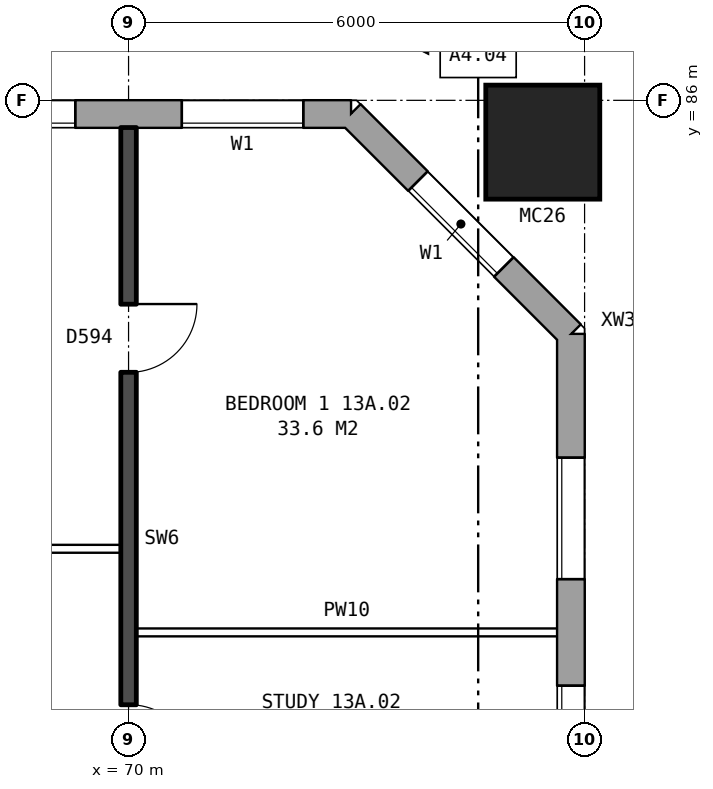
"""IFC4 building model, lengths in metres.
Left out: names, types, materials, properties, quantities, classifications, styles, units other than length and angle.
Written with IfcOpenShell. Run it as: python <this file> out.ifc"""

import sys

from ifc_helpers import new_model, si_unit, direction, frame, frame_2d, origin, origin_2d, place, context, subcontext, project, spatial, rectangle, hollow_rectangle, extrude, element, fill, save


model = new_model("IFC4")
c1 = context("Model", 3, precision=1e-05, world=origin(), true_north=direction((0.0, 1.0)))
c2 = subcontext(c1, "Body", "Model", "MODEL_VIEW")
j1 = project(units=[si_unit("LENGTHUNIT", "METRE"), si_unit("PLANEANGLEUNIT", "RADIAN")], contexts=[c1])
p1 = place(None, origin())
s1 = spatial("IfcSite", under=j1, at=p1, CompositionType="ELEMENT")
p2 = place(p1, origin())
s2 = spatial("IfcBuilding", under=s1, at=p2, CompositionType="ELEMENT")
p3 = place(p2, frame((0.0, 0.0, 50.5)))
s3 = spatial("IfcBuildingStorey", under=s2, at=p3, CompositionType="ELEMENT", Elevation=50.5)
p4 = place(p3, frame((75.45, 85.45, 0.0), z_axis=(0.0, 0.0, 1.0), x_axis=(1.0, 0.0, 0.0)))
e1 = element("IfcColumn", 1, at=p4, inside=s3, PredefinedType="COLUMN", context=c2, shape_type="SweptSolid", body=[
    extrude(hollow_rectangle(XDim=1.5, YDim=1.5, WallThickness=0.08, at=origin_2d()), origin(), (0.0, 0.0, 1.0), 3.1),
])
p5 = place(p3, frame((75.82, 57.075, 0.0), z_axis=(0.0, 0.0, 1.0), x_axis=(0.0, 1.0, 0.0)))
e2 = element("IfcWall", 2, at=p5, inside=s3, PredefinedType="STANDARD", context=c2, shape_type="SweptSolid", body=[
    extrude(rectangle(XDim=25.851, YDim=0.36, at=frame_2d((12.925, 0.0))), origin(), (0.0, 0.0, 1.0), 2.85),
])
p6 = place(p5, frame((1.625, 0.0, 0.8)))
e3 = element("IfcOpeningElement", 3, at=p6, cuts=e2, PredefinedType="OPENING", context=c2, shape_type="SweptSolid", body=[
    extrude(rectangle(XDim=1.6, YDim=1.8, at=frame_2d((0.8, 0.9))), frame((0.0, 0.19, 0.0), z_axis=(0.0, -1.0, 0.0), x_axis=(1.0, 0.0, 0.0)), (0.0, 0.0, 1.0), 0.38),
])
p7 = place(p5, frame((4.625, 0.0, 0.8)))
e4 = element("IfcOpeningElement", 4, at=p7, cuts=e2, PredefinedType="OPENING", context=c2, shape_type="SweptSolid", body=[
    extrude(rectangle(XDim=1.6, YDim=1.8, at=frame_2d((0.8, 0.9))), frame((0.0, 0.19, 0.0), z_axis=(0.0, -1.0, 0.0), x_axis=(1.0, 0.0, 0.0)), (0.0, 0.0, 1.0), 0.38),
])
p8 = place(p5, frame((19.625, 0.0, 0.8)))
e5 = element("IfcOpeningElement", 5, at=p8, cuts=e2, PredefinedType="OPENING", context=c2, shape_type="SweptSolid", body=[
    extrude(rectangle(XDim=1.6, YDim=1.8, at=frame_2d((0.8, 0.9))), frame((0.0, 0.19, 0.0), z_axis=(0.0, -1.0, 0.0), x_axis=(1.0, 0.0, 0.0)), (0.0, 0.0, 1.0), 0.38),
])
p9 = place(p5, frame((22.625, 0.0, 0.8)))
e6 = element("IfcOpeningElement", 6, at=p9, cuts=e2, PredefinedType="OPENING", context=c2, shape_type="SweptSolid", body=[
    extrude(rectangle(XDim=1.6, YDim=1.8, at=frame_2d((0.8, 0.9))), frame((0.0, 0.19, 0.0), z_axis=(0.0, -1.0, 0.0), x_axis=(1.0, 0.0, 0.0)), (0.0, 0.0, 1.0), 0.38),
])
p10 = place(p3, frame((75.82, 82.925, 0.0), z_axis=(0.0, 0.0, 1.0), x_axis=(-0.707106781187, 0.707106781187, 0.0)))
e7 = element("IfcWall", 7, at=p10, inside=s3, PredefinedType="STANDARD", context=c2, shape_type="SweptSolid", body=[
    extrude(rectangle(XDim=4.094, YDim=0.36, at=frame_2d((2.047, 0.0))), origin(), (0.0, 0.0, 1.0), 2.85),
])
p11 = place(p10, frame((1.247, 0.0, 0.8)))
e8 = element("IfcOpeningElement", 8, at=p11, cuts=e7, PredefinedType="OPENING", context=c2, shape_type="SweptSolid", body=[
    extrude(rectangle(XDim=1.6, YDim=1.8, at=frame_2d((0.8, 0.9))), frame((0.0, 0.19, 0.0), z_axis=(0.0, -1.0, 0.0), x_axis=(1.0, 0.0, 0.0)), (0.0, 0.0, 1.0), 0.38),
])
p12 = place(p3, frame((72.925, 85.82, 0.0), z_axis=(0.0, 0.0, 1.0), x_axis=(-1.0, 0.0, 0.0)))
e9 = element("IfcWall", 9, at=p12, inside=s3, PredefinedType="STANDARD", context=c2, shape_type="SweptSolid", body=[
    extrude(rectangle(XDim=48.351, YDim=0.36, at=frame_2d((24.175, 0.0))), origin(), (0.0, 0.0, 1.0), 2.85),
])
p13 = place(p12, frame((0.625, 0.0, 0.8)))
e10 = element("IfcOpeningElement", 10, at=p13, cuts=e9, PredefinedType="OPENING", context=c2, shape_type="SweptSolid", body=[
    extrude(rectangle(XDim=1.6, YDim=1.8, at=frame_2d((0.8, 0.9))), frame((0.0, 0.19, 0.0), z_axis=(0.0, -1.0, 0.0), x_axis=(1.0, 0.0, 0.0)), (0.0, 0.0, 1.0), 0.38),
])
p14 = place(p12, frame((3.625, 0.0, 0.8)))
e11 = element("IfcOpeningElement", 11, at=p14, cuts=e9, PredefinedType="OPENING", context=c2, shape_type="SweptSolid", body=[
    extrude(rectangle(XDim=1.6, YDim=1.8, at=frame_2d((0.8, 0.9))), frame((0.0, 0.19, 0.0), z_axis=(0.0, -1.0, 0.0), x_axis=(1.0, 0.0, 0.0)), (0.0, 0.0, 1.0), 0.38),
])
p15 = place(p12, frame((5.525, 0.0, 0.8)))
e12 = element("IfcOpeningElement", 12, at=p15, cuts=e9, PredefinedType="OPENING", context=c2, shape_type="SweptSolid", body=[
    extrude(rectangle(XDim=1.4, YDim=1.8, at=frame_2d((0.7, 0.9))), frame((0.0, 0.19, 0.0), z_axis=(0.0, -1.0, 0.0), x_axis=(1.0, 0.0, 0.0)), (0.0, 0.0, 1.0), 0.38),
])
p16 = place(p12, frame((9.225, 0.0, 0.45)))
e13 = element("IfcOpeningElement", 13, at=p16, cuts=e9, PredefinedType="OPENING", context=c2, shape_type="SweptSolid", body=[
    extrude(rectangle(XDim=1.0, YDim=0.9, at=frame_2d((0.5, 0.45))), frame((0.0, 0.19, 0.0), z_axis=(0.0, -1.0, 0.0), x_axis=(1.0, 0.0, 0.0)), (0.0, 0.0, 1.0), 0.38),
])
p17 = place(p12, frame((12.625, 0.0, 0.8)))
e14 = element("IfcOpeningElement", 14, at=p17, cuts=e9, PredefinedType="OPENING", context=c2, shape_type="SweptSolid", body=[
    extrude(rectangle(XDim=1.6, YDim=1.8, at=frame_2d((0.8, 0.9))), frame((0.0, 0.19, 0.0), z_axis=(0.0, -1.0, 0.0), x_axis=(1.0, 0.0, 0.0)), (0.0, 0.0, 1.0), 0.38),
])
p18 = place(p12, frame((15.625, 0.0, 0.8)))
e15 = element("IfcOpeningElement", 15, at=p18, cuts=e9, PredefinedType="OPENING", context=c2, shape_type="SweptSolid", body=[
    extrude(rectangle(XDim=1.6, YDim=1.8, at=frame_2d((0.8, 0.9))), frame((0.0, 0.19, 0.0), z_axis=(0.0, -1.0, 0.0), x_axis=(1.0, 0.0, 0.0)), (0.0, 0.0, 1.0), 0.38),
])
p19 = place(p12, frame((18.625, 0.0, 0.8)))
e16 = element("IfcOpeningElement", 16, at=p19, cuts=e9, PredefinedType="OPENING", context=c2, shape_type="SweptSolid", body=[
    extrude(rectangle(XDim=1.6, YDim=1.8, at=frame_2d((0.8, 0.9))), frame((0.0, 0.19, 0.0), z_axis=(0.0, -1.0, 0.0), x_axis=(1.0, 0.0, 0.0)), (0.0, 0.0, 1.0), 0.38),
])
p20 = place(p12, frame((21.625, 0.0, 0.8)))
e17 = element("IfcOpeningElement", 17, at=p20, cuts=e9, PredefinedType="OPENING", context=c2, shape_type="SweptSolid", body=[
    extrude(rectangle(XDim=1.6, YDim=1.8, at=frame_2d((0.8, 0.9))), frame((0.0, 0.19, 0.0), z_axis=(0.0, -1.0, 0.0), x_axis=(1.0, 0.0, 0.0)), (0.0, 0.0, 1.0), 0.38),
])
p21 = place(p12, frame((24.625, 0.0, 0.8)))
e18 = element("IfcOpeningElement", 18, at=p21, cuts=e9, PredefinedType="OPENING", context=c2, shape_type="SweptSolid", body=[
    extrude(rectangle(XDim=1.6, YDim=1.8, at=frame_2d((0.8, 0.9))), frame((0.0, 0.19, 0.0), z_axis=(0.0, -1.0, 0.0), x_axis=(1.0, 0.0, 0.0)), (0.0, 0.0, 1.0), 0.38),
])
p22 = place(p12, frame((27.625, 0.0, 0.8)))
e19 = element("IfcOpeningElement", 19, at=p22, cuts=e9, PredefinedType="OPENING", context=c2, shape_type="SweptSolid", body=[
    extrude(rectangle(XDim=1.6, YDim=1.8, at=frame_2d((0.8, 0.9))), frame((0.0, 0.19, 0.0), z_axis=(0.0, -1.0, 0.0), x_axis=(1.0, 0.0, 0.0)), (0.0, 0.0, 1.0), 0.38),
])
p23 = place(p12, frame((30.625, 0.0, 0.8)))
e20 = element("IfcOpeningElement", 20, at=p23, cuts=e9, PredefinedType="OPENING", context=c2, shape_type="SweptSolid", body=[
    extrude(rectangle(XDim=1.6, YDim=1.8, at=frame_2d((0.8, 0.9))), frame((0.0, 0.19, 0.0), z_axis=(0.0, -1.0, 0.0), x_axis=(1.0, 0.0, 0.0)), (0.0, 0.0, 1.0), 0.38),
])
p24 = place(p12, frame((33.625, 0.0, 0.8)))
e21 = element("IfcOpeningElement", 21, at=p24, cuts=e9, PredefinedType="OPENING", context=c2, shape_type="SweptSolid", body=[
    extrude(rectangle(XDim=1.6, YDim=1.8, at=frame_2d((0.8, 0.9))), frame((0.0, 0.19, 0.0), z_axis=(0.0, -1.0, 0.0), x_axis=(1.0, 0.0, 0.0)), (0.0, 0.0, 1.0), 0.38),
])
p25 = place(p12, frame((36.125, 0.0, 0.8)))
e22 = element("IfcOpeningElement", 22, at=p25, cuts=e9, PredefinedType="OPENING", context=c2, shape_type="SweptSolid", body=[
    extrude(rectangle(XDim=1.0, YDim=1.8, at=frame_2d((0.5, 0.9))), frame((0.0, 0.19, 0.0), z_axis=(0.0, -1.0, 0.0), x_axis=(1.0, 0.0, 0.0)), (0.0, 0.0, 1.0), 0.38),
])
p26 = place(p12, frame((39.975, 0.0, 1.7)))
e23 = element("IfcOpeningElement", 23, at=p26, cuts=e9, PredefinedType="OPENING", context=c2, shape_type="SweptSolid", body=[
    extrude(rectangle(XDim=1.0, YDim=0.9, at=frame_2d((0.5, 0.45))), frame((0.0, 0.19, 0.0), z_axis=(0.0, -1.0, 0.0), x_axis=(1.0, 0.0, 0.0)), (0.0, 0.0, 1.0), 0.38),
])
p27 = place(p12, frame((42.625, 0.0, 0.8)))
e24 = element("IfcOpeningElement", 24, at=p27, cuts=e9, PredefinedType="OPENING", context=c2, shape_type="SweptSolid", body=[
    extrude(rectangle(XDim=1.6, YDim=1.8, at=frame_2d((0.8, 0.9))), frame((0.0, 0.19, 0.0), z_axis=(0.0, -1.0, 0.0), x_axis=(1.0, 0.0, 0.0)), (0.0, 0.0, 1.0), 0.38),
])
p28 = place(p12, frame((45.625, 0.0, 0.8)))
e25 = element("IfcOpeningElement", 25, at=p28, cuts=e9, PredefinedType="OPENING", context=c2, shape_type="SweptSolid", body=[
    extrude(rectangle(XDim=1.6, YDim=1.8, at=frame_2d((0.8, 0.9))), frame((0.0, 0.19, 0.0), z_axis=(0.0, -1.0, 0.0), x_axis=(1.0, 0.0, 0.0)), (0.0, 0.0, 1.0), 0.38),
])
p29 = place(p12, frame((7.225, 0.0, 1.6)))
e26 = element("IfcOpeningElement", 26, at=p29, cuts=e9, PredefinedType="OPENING", context=c2, shape_type="SweptSolid", body=[
    extrude(rectangle(XDim=1.0, YDim=0.9, at=frame_2d((0.5, 0.45))), frame((0.0, 0.19, 0.0), z_axis=(0.0, -1.0, 0.0), x_axis=(1.0, 0.0, 0.0)), (0.0, 0.0, 1.0), 0.38),
])
p30 = place(p12, frame((10.575, 0.0, 0.45)))
e27 = element("IfcOpeningElement", 27, at=p30, cuts=e9, PredefinedType="OPENING", context=c2, shape_type="SweptSolid", body=[
    extrude(rectangle(XDim=1.2, YDim=1.8, at=frame_2d((0.6, 0.9))), frame((0.0, 0.19, 0.0), z_axis=(0.0, -1.0, 0.0), x_axis=(1.0, 0.0, 0.0)), (0.0, 0.0, 1.0), 0.38),
])
p31 = place(p12, frame((37.425, 0.0, 0.8)))
e28 = element("IfcOpeningElement", 28, at=p31, cuts=e9, PredefinedType="OPENING", context=c2, shape_type="SweptSolid", body=[
    extrude(rectangle(XDim=1.0, YDim=0.9, at=frame_2d((0.5, 0.45))), frame((0.0, 0.19, 0.0), z_axis=(0.0, -1.0, 0.0), x_axis=(1.0, 0.0, 0.0)), (0.0, 0.0, 1.0), 0.38),
])
p32 = place(p12, frame((41.275, 0.0, 0.8)))
e29 = element("IfcOpeningElement", 29, at=p32, cuts=e9, PredefinedType="OPENING", context=c2, shape_type="SweptSolid", body=[
    extrude(rectangle(XDim=1.0, YDim=1.8, at=frame_2d((0.5, 0.9))), frame((0.0, 0.19, 0.0), z_axis=(0.0, -1.0, 0.0), x_axis=(1.0, 0.0, 0.0)), (0.0, 0.0, 1.0), 0.38),
])
p33 = place(p3, frame((70.1, 79.0, 0.0), z_axis=(0.0, 0.0, 1.0), x_axis=(1.0, 0.0, 0.0)))
e30 = element("IfcWall", 30, at=p33, inside=s3, PredefinedType="PARTITIONING", context=c2, shape_type="SweptSolid", body=[
    extrude(rectangle(XDim=5.54, YDim=0.1, at=frame_2d((2.77, 0.0))), origin(), (0.0, 0.0, 1.0), 2.85),
])
p34 = place(p3, frame((64.1, 80.1, 0.0), z_axis=(0.0, 0.0, 1.0), x_axis=(1.0, 0.0, 0.0)))
e31 = element("IfcWall", 31, at=p34, inside=s3, PredefinedType="PARTITIONING", context=c2, shape_type="SweptSolid", body=[
    extrude(rectangle(XDim=5.8, YDim=0.1, at=frame_2d((2.9, 0.0))), origin(), (0.0, 0.0, 1.0), 2.85),
])
p35 = place(p34, frame((3.6, 0.0, 0.0)))
e32 = element("IfcOpeningElement", 32, at=p35, cuts=e31, PredefinedType="OPENING", context=c2, shape_type="SweptSolid", body=[
    extrude(rectangle(XDim=0.9, YDim=2.1, at=frame_2d((0.45, 1.05))), frame((0.0, 0.06, 0.0), z_axis=(0.0, -1.0, 0.0), x_axis=(1.0, 0.0, 0.0)), (0.0, 0.0, 1.0), 0.12),
])
p36 = place(p34, frame((0.7, 0.0, 0.0)))
e33 = element("IfcOpeningElement", 33, at=p36, cuts=e31, PredefinedType="OPENING", context=c2, shape_type="SweptSolid", body=[
    extrude(rectangle(XDim=0.9, YDim=2.1, at=frame_2d((0.45, 1.05))), frame((0.0, 0.06, 0.0), z_axis=(0.0, -1.0, 0.0), x_axis=(1.0, 0.0, 0.0)), (0.0, 0.0, 1.0), 0.12),
])
p37 = place(p3, frame((70.0, 76.2, 0.0), z_axis=(0.0, 0.0, 1.0), x_axis=(0.0, 1.0, 0.0)))
e34 = element("IfcWall", 34, at=p37, inside=s3, PredefinedType="SOLIDWALL", context=c2, shape_type="SweptSolid", body=[
    extrude(rectangle(XDim=9.44, YDim=0.2, at=frame_2d((4.72, 0.0))), origin(), (0.0, 0.0, 1.0), 2.85),
])
p38 = place(p37, frame((6.22, 0.0, 0.0)))
e35 = element("IfcOpeningElement", 35, at=p38, cuts=e34, PredefinedType="OPENING", context=c2, shape_type="SweptSolid", body=[
    extrude(rectangle(XDim=0.9, YDim=2.1, at=frame_2d((0.45, 1.05))), frame((0.0, 0.11, 0.0), z_axis=(0.0, -1.0, 0.0), x_axis=(1.0, 0.0, 0.0)), (0.0, 0.0, 1.0), 0.22),
])
p39 = place(p37, frame((0.95, 0.0, 0.0)))
e36 = element("IfcOpeningElement", 36, at=p39, cuts=e34, PredefinedType="OPENING", context=c2, shape_type="SweptSolid", body=[
    extrude(rectangle(XDim=0.9, YDim=2.1, at=frame_2d((0.45, 1.05))), frame((0.0, 0.11, 0.0), z_axis=(0.0, -1.0, 0.0), x_axis=(1.0, 0.0, 0.0)), (0.0, 0.0, 1.0), 0.22),
])
p40 = place(p8, origin())
e37 = element("IfcWindow", 37, at=p40, inside=s3, PartitioningType="SINGLE_PANEL", PredefinedType="WINDOW", context=c2, shape_type="SweptSolid", body=[
    extrude(rectangle(XDim=1.6, YDim=1.8, at=frame_2d((0.8, 0.9))), frame((0.0, 0.15, 0.0), z_axis=(0.0, -1.0, 0.0), x_axis=(1.0, 0.0, 0.0)), (0.0, 0.0, 1.0), 0.06),
])
fill(e5, e37)
p41 = place(p9, origin())
e38 = element("IfcWindow", 38, at=p41, inside=s3, PartitioningType="SINGLE_PANEL", PredefinedType="WINDOW", context=c2, shape_type="SweptSolid", body=[
    extrude(rectangle(XDim=1.6, YDim=1.8, at=frame_2d((0.8, 0.9))), frame((0.0, 0.15, 0.0), z_axis=(0.0, -1.0, 0.0), x_axis=(1.0, 0.0, 0.0)), (0.0, 0.0, 1.0), 0.06),
])
fill(e6, e38)
p42 = place(p11, origin())
e39 = element("IfcWindow", 39, at=p42, inside=s3, PartitioningType="SINGLE_PANEL", PredefinedType="WINDOW", context=c2, shape_type="SweptSolid", body=[
    extrude(rectangle(XDim=1.6, YDim=1.8, at=frame_2d((0.8, 0.9))), frame((0.0, 0.15, 0.0), z_axis=(0.0, -1.0, 0.0), x_axis=(1.0, 0.0, 0.0)), (0.0, 0.0, 1.0), 0.06),
])
fill(e8, e39)
p43 = place(p13, origin())
e40 = element("IfcWindow", 40, at=p43, inside=s3, PartitioningType="SINGLE_PANEL", PredefinedType="WINDOW", context=c2, shape_type="SweptSolid", body=[
    extrude(rectangle(XDim=1.6, YDim=1.8, at=frame_2d((0.8, 0.9))), frame((0.0, 0.15, 0.0), z_axis=(0.0, -1.0, 0.0), x_axis=(1.0, 0.0, 0.0)), (0.0, 0.0, 1.0), 0.06),
])
fill(e10, e40)
p44 = place(p14, origin())
e41 = element("IfcWindow", 41, at=p44, inside=s3, PartitioningType="SINGLE_PANEL", PredefinedType="WINDOW", context=c2, shape_type="SweptSolid", body=[
    extrude(rectangle(XDim=1.6, YDim=1.8, at=frame_2d((0.8, 0.9))), frame((0.0, 0.15, 0.0), z_axis=(0.0, -1.0, 0.0), x_axis=(1.0, 0.0, 0.0)), (0.0, 0.0, 1.0), 0.06),
])
fill(e11, e41)
p45 = place(p38, frame((0.9, 0.0, 0.0), z_axis=(0.0, 0.0, 1.0), x_axis=(-1.0, 0.0, 0.0)))
e42 = element("IfcDoor", 42, at=p45, inside=s3, OperationType="SINGLE_SWING_LEFT", PredefinedType="DOOR", context=c2, shape_type="SweptSolid", body=[
    extrude(rectangle(XDim=0.9, YDim=2.1, at=frame_2d((0.45, 1.05))), frame((0.0, 0.025, 0.0), z_axis=(0.0, -1.0, 0.0), x_axis=(1.0, 0.0, 0.0)), (0.0, 0.0, 1.0), 0.05),
])
fill(e35, e42)
p46 = place(p39, frame((0.9, 0.0, 0.0), z_axis=(0.0, 0.0, 1.0), x_axis=(-1.0, 0.0, 0.0)))
e43 = element("IfcDoor", 43, at=p46, inside=s3, OperationType="SINGLE_SWING_RIGHT", PredefinedType="DOOR", context=c2, shape_type="SweptSolid", body=[
    extrude(rectangle(XDim=0.9, YDim=2.1, at=frame_2d((0.45, 1.05))), frame((0.0, 0.025, 0.0), z_axis=(0.0, -1.0, 0.0), x_axis=(1.0, 0.0, 0.0)), (0.0, 0.0, 1.0), 0.05),
])
fill(e36, e43)
save(model, sys.argv[1])
